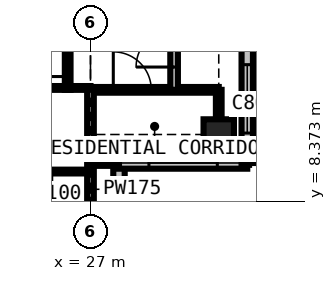
"""IFC4 building model, lengths in metres.
Left out: names, types, materials, properties, quantities, classifications, styles, units other than length and angle.
Written with IfcOpenShell. Run it as: python <this file> out.ifc"""

import sys

from ifc_helpers import new_model, si_unit, direction, frame, frame_2d, origin, origin_2d, place, context, subcontext, project, spatial, rectangle, extrude, element, fill, save


model = new_model("IFC4")
c1 = context("Model", 3, precision=1e-05, world=origin(), true_north=direction((0.0, 1.0)))
c2 = subcontext(c1, "Body", "Model", "MODEL_VIEW")
j1 = project(units=[si_unit("LENGTHUNIT", "METRE"), si_unit("PLANEANGLEUNIT", "RADIAN")], contexts=[c1])
p1 = place(None, origin())
s1 = spatial("IfcSite", under=j1, at=p1, CompositionType="ELEMENT")
p2 = place(p1, origin())
s2 = spatial("IfcBuilding", under=s1, at=p2, CompositionType="ELEMENT")
p3 = place(p2, frame((0.0, 0.0, 243.9)))
s3 = spatial("IfcBuildingStorey", under=s2, at=p3, CompositionType="ELEMENT", Elevation=243.9)
p4 = place(p3, frame((30.375, 10.125, 0.0), z_axis=(0.0, 0.0, 1.0), x_axis=(1.0, 0.0, 0.0)))
e1 = element("IfcColumn", 1, at=p4, inside=s3, PredefinedType="COLUMN", context=c2, shape_type="SweptSolid", body=[
    extrude(rectangle(XDim=0.8, YDim=0.8, at=origin_2d()), origin(), (0.0, 0.0, 1.0), 3.6),
])
p5 = place(p3, frame((27.75, 6.0, 0.0), z_axis=(0.0, 0.0, 1.0), x_axis=(0.0, 1.0, 0.0)))
e2 = element("IfcWall", 2, at=p5, inside=s3, PredefinedType="SOLIDWALL", context=c2, shape_type="SweptSolid", body=[
    extrude(rectangle(XDim=3.375, YDim=0.3, at=frame_2d((1.688, 0.0))), origin(), (0.0, 0.0, 1.0), 3.375),
])
p6 = place(p5, frame((0.788, 0.0, 0.6)))
e3 = element("IfcOpeningElement", 3, at=p6, cuts=e2, PredefinedType="OPENING", context=c2, shape_type="SweptSolid", body=[
    extrude(rectangle(XDim=1.8, YDim=2.1, at=frame_2d((0.9, 1.05))), frame((0.0, 0.16, 0.0), z_axis=(0.0, -1.0, 0.0), x_axis=(1.0, 0.0, 0.0)), (0.0, 0.0, 1.0), 0.32),
])
p7 = place(p3, frame((27.75, 9.375, 0.0), z_axis=(0.0, 0.0, 1.0), x_axis=(1.0, 0.0, 0.0)))
e4 = element("IfcWall", 4, at=p7, inside=s3, PredefinedType="SOLIDWALL", context=c2, shape_type="SweptSolid", body=[
    extrude(rectangle(XDim=3.375, YDim=0.3, at=frame_2d((1.688, 0.0))), origin(), (0.0, 0.0, 1.0), 3.375),
])
p8 = place(p7, frame((0.788, 0.0, 0.6)))
e5 = element("IfcOpeningElement", 5, at=p8, cuts=e4, PredefinedType="OPENING", context=c2, shape_type="SweptSolid", body=[
    extrude(rectangle(XDim=1.8, YDim=2.1, at=frame_2d((0.9, 1.05))), frame((0.0, 0.16, 0.0), z_axis=(0.0, -1.0, 0.0), x_axis=(1.0, 0.0, 0.0)), (0.0, 0.0, 1.0), 0.32),
])
p9 = place(p3, frame((31.125, 9.375, 0.0), z_axis=(0.0, 0.0, 1.0), x_axis=(0.0, 1.0, 0.0)))
e6 = element("IfcWall", 6, at=p9, inside=s3, PredefinedType="SOLIDWALL", context=c2, shape_type="SweptSolid", body=[
    extrude(rectangle(XDim=3.375, YDim=0.3, at=frame_2d((1.688, 0.0))), origin(), (0.0, 0.0, 1.0), 3.375),
])
p10 = place(p9, frame((0.788, 0.0, 0.6)))
e7 = element("IfcOpeningElement", 7, at=p10, cuts=e6, PredefinedType="OPENING", context=c2, shape_type="SweptSolid", body=[
    extrude(rectangle(XDim=1.8, YDim=2.1, at=frame_2d((0.9, 1.05))), frame((0.0, 0.16, 0.0), z_axis=(0.0, -1.0, 0.0), x_axis=(1.0, 0.0, 0.0)), (0.0, 0.0, 1.0), 0.32),
])
p11 = place(p3, frame((23.625, 11.35, 0.0), z_axis=(0.0, 0.0, 1.0), x_axis=(1.0, 0.0, 0.0)))
e8 = element("IfcWall", 8, at=p11, inside=s3, PredefinedType="PARTITIONING", context=c2, shape_type="SweptSolid", body=[
    extrude(rectangle(XDim=3.375, YDim=0.1, at=frame_2d((1.688, 0.0))), origin(), (0.0, 0.0, 1.0), 3.375),
])
p12 = place(p11, frame((0.2, 0.0, 0.0)))
e9 = element("IfcOpeningElement", 9, at=p12, cuts=e8, PredefinedType="OPENING", context=c2, shape_type="SweptSolid", body=[
    extrude(rectangle(XDim=0.95, YDim=2.2, at=frame_2d((0.475, 1.1))), frame((0.0, 0.06, 0.0), z_axis=(0.0, -1.0, 0.0), x_axis=(1.0, 0.0, 0.0)), (0.0, 0.0, 1.0), 0.12),
])
p13 = place(p3, frame((25.0, 9.15, 0.0), z_axis=(0.0, 0.0, 1.0), x_axis=(1.0, 0.0, 0.0)))
e10 = element("IfcWall", 10, at=p13, inside=s3, PredefinedType="PARTITIONING", context=c2, shape_type="SweptSolid", body=[
    extrude(rectangle(XDim=2.0, YDim=0.1, at=frame_2d((1.0, 0.0))), origin(), (0.0, 0.0, 1.0), 3.375),
])
p14 = place(p3, frame((26.4, 11.3, 0.0), z_axis=(0.0, 0.0, 1.0), x_axis=(0.0, 1.0, 0.0)))
e11 = element("IfcWall", 11, at=p14, inside=s3, PredefinedType="PARTITIONING", context=c2, shape_type="SweptSolid", body=[
    extrude(rectangle(XDim=1.6, YDim=0.15, at=frame_2d((0.8, 0.0))), origin(), (0.0, 0.0, 1.0), 3.375),
])
p15 = place(p14, frame((0.35, 0.0, 0.0)))
e12 = element("IfcOpeningElement", 12, at=p15, cuts=e11, PredefinedType="OPENING", context=c2, shape_type="SweptSolid", body=[
    extrude(rectangle(XDim=1.0, YDim=2.2, at=frame_2d((0.5, 1.1))), frame((0.0, 0.085, 0.0), z_axis=(0.0, -1.0, 0.0), x_axis=(1.0, 0.0, 0.0)), (0.0, 0.0, 1.0), 0.17),
])
p16 = place(p3, frame((27.0, 11.3, 0.0), z_axis=(0.0, 0.0, 1.0), x_axis=(1.0, 0.0, 0.0)))
e13 = element("IfcWall", 13, at=p16, inside=s3, PredefinedType="PARTITIONING", context=c2, shape_type="SweptSolid", body=[
    extrude(rectangle(XDim=3.375, YDim=0.15, at=frame_2d((1.688, 0.0))), origin(), (0.0, 0.0, 1.0), 3.375),
])
p17 = place(p16, frame((0.6, 0.0, 0.0)))
e14 = element("IfcOpeningElement", 14, at=p17, cuts=e13, PredefinedType="OPENING", context=c2, shape_type="SweptSolid", body=[
    extrude(rectangle(XDim=1.0, YDim=2.2, at=frame_2d((0.5, 1.1))), frame((0.0, 0.085, 0.0), z_axis=(0.0, -1.0, 0.0), x_axis=(1.0, 0.0, 0.0)), (0.0, 0.0, 1.0), 0.17),
])
p18 = place(p3, frame((27.0, 6.016, 0.0), z_axis=(0.0, 0.0, 1.0), x_axis=(0.0, 1.0, 0.0)))
e15 = element("IfcWall", 15, at=p18, inside=s3, PredefinedType="PARTITIONING", context=c2, shape_type="SweptSolid", body=[
    extrude(rectangle(XDim=5.334, YDim=0.175, at=frame_2d((2.667, 0.0))), origin(), (0.0, 0.0, 1.0), 2.877),
])
p19 = place(p3, frame((27.0, 9.375, 0.0), z_axis=(0.0, 0.0, 1.0), x_axis=(1.0, 0.0, 0.0)))
e16 = element("IfcWall", 16, at=p19, inside=s3, PredefinedType="PARTITIONING", context=c2, shape_type="SweptSolid", body=[
    extrude(rectangle(XDim=0.734, YDim=0.15, at=frame_2d((0.367, 0.0))), origin(), (0.0, 0.0, 1.0), 3.375),
])
p20 = place(p3, frame((29.2, 11.3, 0.0), z_axis=(0.0, 0.0, 1.0), x_axis=(0.0, 1.0, 0.0)))
e17 = element("IfcWall", 17, at=p20, inside=s3, PredefinedType="PARTITIONING", context=c2, shape_type="SweptSolid", body=[
    extrude(rectangle(XDim=17.9, YDim=0.2, at=frame_2d((8.95, 0.0))), origin(), (0.0, 0.0, 1.0), 3.375),
])
p21 = place(p20, frame((0.6, 0.0, 0.0)))
e18 = element("IfcOpeningElement", 18, at=p21, cuts=e17, PredefinedType="OPENING", context=c2, shape_type="SweptSolid", body=[
    extrude(rectangle(XDim=1.0, YDim=2.2, at=frame_2d((0.5, 1.1))), frame((0.0, 0.11, 0.0), z_axis=(0.0, -1.0, 0.0), x_axis=(1.0, 0.0, 0.0)), (0.0, 0.0, 1.0), 0.22),
])
p22 = place(p20, frame((2.4, 0.0, 0.0)))
e19 = element("IfcOpeningElement", 19, at=p22, cuts=e17, PredefinedType="OPENING", context=c2, shape_type="SweptSolid", body=[
    extrude(rectangle(XDim=0.95, YDim=2.2, at=frame_2d((0.475, 1.1))), frame((0.0, 0.11, 0.0), z_axis=(0.0, -1.0, 0.0), x_axis=(1.0, 0.0, 0.0)), (0.0, 0.0, 1.0), 0.22),
])
p23 = place(p20, frame((5.825, 0.0, 0.0)))
e20 = element("IfcOpeningElement", 20, at=p23, cuts=e17, PredefinedType="OPENING", context=c2, shape_type="SweptSolid", body=[
    extrude(rectangle(XDim=0.95, YDim=2.2, at=frame_2d((0.475, 1.1))), frame((0.0, 0.11, 0.0), z_axis=(0.0, -1.0, 0.0), x_axis=(1.0, 0.0, 0.0)), (0.0, 0.0, 1.0), 0.22),
])
p24 = place(p20, frame((9.2, 0.0, 0.0)))
e21 = element("IfcOpeningElement", 21, at=p24, cuts=e17, PredefinedType="OPENING", context=c2, shape_type="SweptSolid", body=[
    extrude(rectangle(XDim=0.95, YDim=2.2, at=frame_2d((0.475, 1.1))), frame((0.0, 0.11, 0.0), z_axis=(0.0, -1.0, 0.0), x_axis=(1.0, 0.0, 0.0)), (0.0, 0.0, 1.0), 0.22),
])
p25 = place(p20, frame((12.575, 0.0, 0.0)))
e22 = element("IfcOpeningElement", 22, at=p25, cuts=e17, PredefinedType="OPENING", context=c2, shape_type="SweptSolid", body=[
    extrude(rectangle(XDim=0.95, YDim=2.2, at=frame_2d((0.475, 1.1))), frame((0.0, 0.11, 0.0), z_axis=(0.0, -1.0, 0.0), x_axis=(1.0, 0.0, 0.0)), (0.0, 0.0, 1.0), 0.22),
])
p26 = place(p20, frame((16.3, 0.0, 0.0)))
e23 = element("IfcOpeningElement", 23, at=p26, cuts=e17, PredefinedType="OPENING", context=c2, shape_type="SweptSolid", body=[
    extrude(rectangle(XDim=1.0, YDim=2.2, at=frame_2d((0.5, 1.1))), frame((0.0, 0.11, 0.0), z_axis=(0.0, -1.0, 0.0), x_axis=(1.0, 0.0, 0.0)), (0.0, 0.0, 1.0), 0.22),
])
p27 = place(p3, frame((30.375, 9.525, 0.0), z_axis=(0.0, 0.0, 1.0), x_axis=(0.0, 1.0, 0.0)))
e24 = element("IfcWall", 24, at=p27, inside=s3, PredefinedType="PARTITIONING", context=c2, shape_type="SweptSolid", body=[
    extrude(rectangle(XDim=1.775, YDim=0.15, at=frame_2d((0.888, 0.0))), origin(), (0.0, 0.0, 1.0), 2.877),
])
p28 = place(p6, origin())
e25 = element("IfcWindow", 25, at=p28, inside=s3, PartitioningType="SINGLE_PANEL", PredefinedType="WINDOW", context=c2, shape_type="SweptSolid", body=[
    extrude(rectangle(XDim=1.8, YDim=2.1, at=frame_2d((0.9, 1.05))), frame((0.0, 0.03, 0.0), z_axis=(0.0, -1.0, 0.0), x_axis=(1.0, 0.0, 0.0)), (0.0, 0.0, 1.0), 0.06),
])
fill(e3, e25)
p29 = place(p8, origin())
e26 = element("IfcWindow", 26, at=p29, inside=s3, PartitioningType="SINGLE_PANEL", PredefinedType="WINDOW", context=c2, shape_type="SweptSolid", body=[
    extrude(rectangle(XDim=1.8, YDim=2.1, at=frame_2d((0.9, 1.05))), frame((0.0, 0.03, 0.0), z_axis=(0.0, -1.0, 0.0), x_axis=(1.0, 0.0, 0.0)), (0.0, 0.0, 1.0), 0.06),
])
fill(e5, e26)
p30 = place(p10, origin())
e27 = element("IfcWindow", 27, at=p30, inside=s3, PartitioningType="SINGLE_PANEL", PredefinedType="WINDOW", context=c2, shape_type="SweptSolid", body=[
    extrude(rectangle(XDim=1.8, YDim=2.1, at=frame_2d((0.9, 1.05))), frame((0.0, 0.03, 0.0), z_axis=(0.0, -1.0, 0.0), x_axis=(1.0, 0.0, 0.0)), (0.0, 0.0, 1.0), 0.06),
])
fill(e7, e27)
p31 = place(p17, origin())
e28 = element("IfcDoor", 28, at=p31, inside=s3, OperationType="SINGLE_SWING_LEFT", PredefinedType="DOOR", context=c2, shape_type="SweptSolid", body=[
    extrude(rectangle(XDim=1.0, YDim=2.2, at=frame_2d((0.5, 1.1))), frame((0.0, 0.025, 0.0), z_axis=(0.0, -1.0, 0.0), x_axis=(1.0, 0.0, 0.0)), (0.0, 0.0, 1.0), 0.05),
])
fill(e14, e28)
p32 = place(p15, origin())
e29 = element("IfcDoor", 29, at=p32, inside=s3, OperationType="SINGLE_SWING_LEFT", PredefinedType="DOOR", context=c2, shape_type="SweptSolid", body=[
    extrude(rectangle(XDim=1.0, YDim=2.2, at=frame_2d((0.5, 1.1))), frame((0.0, 0.025, 0.0), z_axis=(0.0, -1.0, 0.0), x_axis=(1.0, 0.0, 0.0)), (0.0, 0.0, 1.0), 0.05),
])
fill(e12, e29)
p33 = place(p21, origin())
e30 = element("IfcDoor", 30, at=p33, inside=s3, OperationType="SINGLE_SWING_LEFT", PredefinedType="DOOR", context=c2, shape_type="SweptSolid", body=[
    extrude(rectangle(XDim=1.0, YDim=2.2, at=frame_2d((0.5, 1.1))), frame((0.0, 0.025, 0.0), z_axis=(0.0, -1.0, 0.0), x_axis=(1.0, 0.0, 0.0)), (0.0, 0.0, 1.0), 0.05),
])
fill(e18, e30)
save(model, sys.argv[1])
